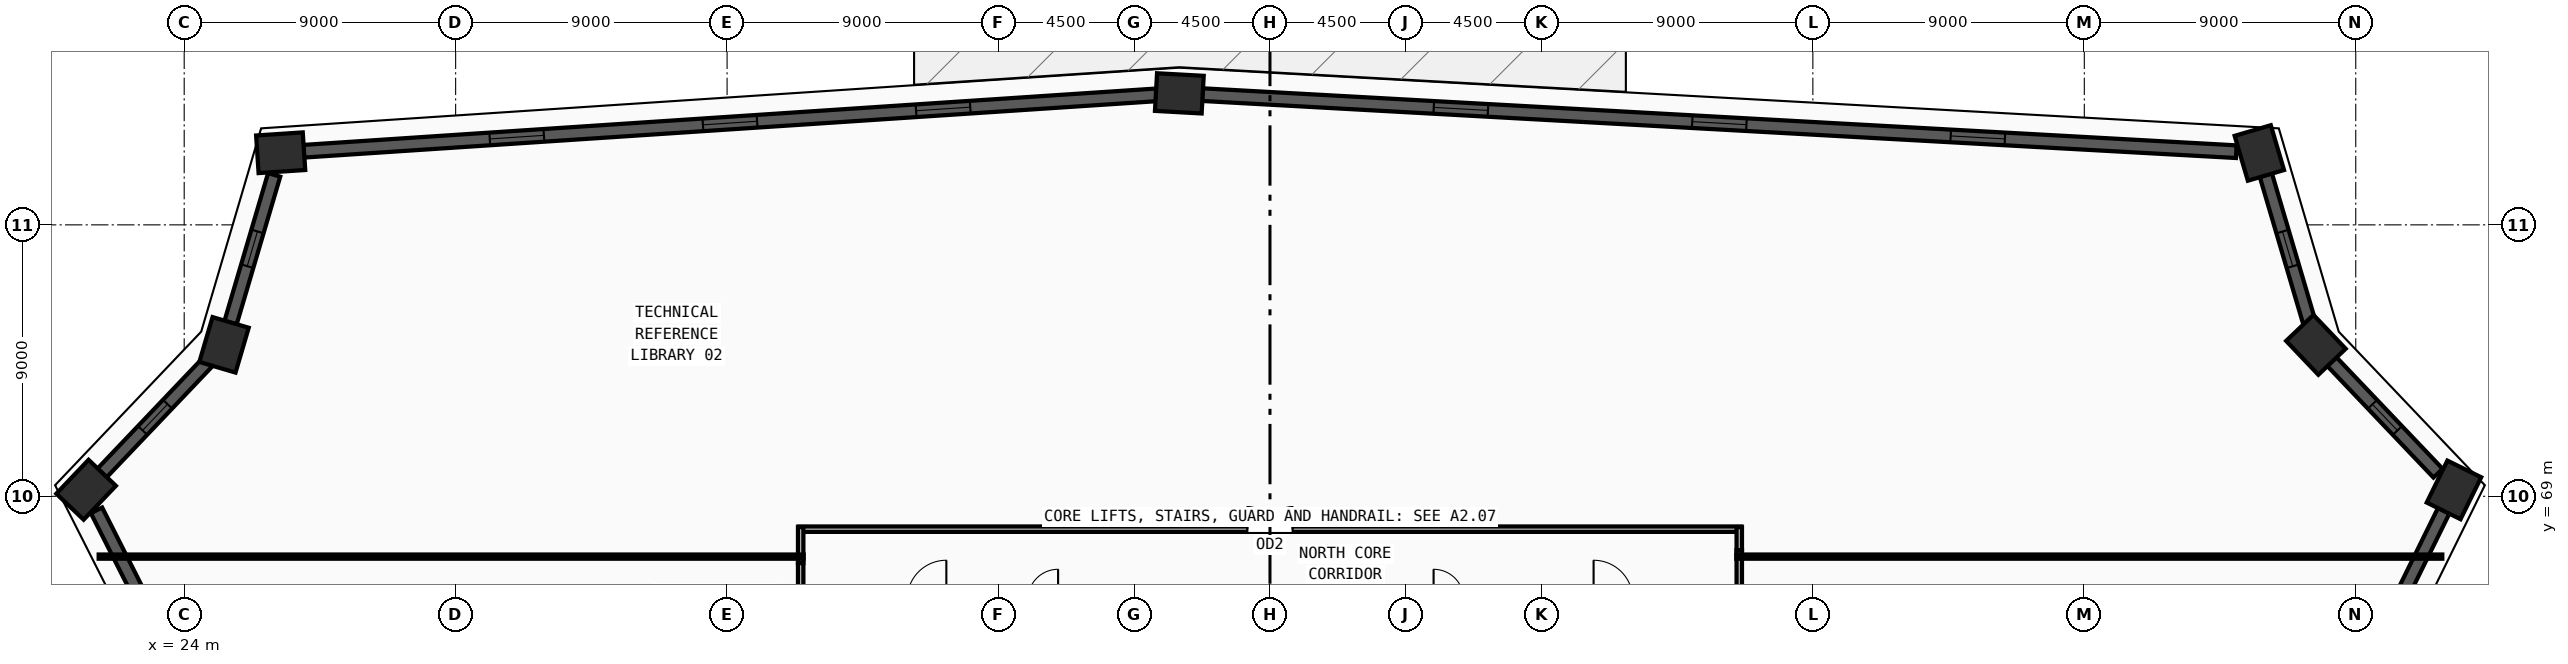
"""IFC4 building model, lengths in metres.
Left out: names, types, materials, properties, quantities, classifications, styles, units other than length and angle.
Written with IfcOpenShell. Run it as: python <this file> out.ifc"""

import sys

from ifc_helpers import new_model, si_unit, direction, frame, frame_2d, origin, origin_2d, place, context, subcontext, project, spatial, rectangle, extrude, source, transform, mapped, element, fill, save


model = new_model("IFC4")
c1 = context("Model", 3, precision=1e-05, world=origin(), true_north=direction((0.0, 1.0)))
c2 = subcontext(c1, "Body", "Model", "MODEL_VIEW")
j1 = project(units=[si_unit("LENGTHUNIT", "METRE"), si_unit("PLANEANGLEUNIT", "RADIAN")], contexts=[c1])
p1 = place(None, origin())
s1 = spatial("IfcSite", under=j1, at=p1, CompositionType="ELEMENT")
p2 = place(p1, origin())
s2 = spatial("IfcBuilding", under=s1, at=p2, CompositionType="ELEMENT")
p3 = place(p2, frame((0.0, 0.0, 28.5)))
s3 = spatial("IfcBuildingStorey", under=s2, at=p3, CompositionType="ELEMENT", Elevation=28.5)
m1 = source(origin(), c2, "Body", "SweptSolid", [
    extrude(rectangle(XDim=1.55, YDim=1.25, at=origin_2d()), origin(), (0.0, 0.0, 1.0), 3.75),
])
for number, where, z_axis, x_axis in (
    (1, (20.748, 69.217, 0.0), (0.0, 0.0, 1.0), (0.689, 0.724, 0.0)),
    (2, (25.321, 74.022, 0.0), (0.0, 0.0, 1.0), (0.283, 0.959, 0.0)),
    (3, (27.199, 80.391, 0.0), (0.0, 0.0, 1.0), (0.998, 0.066, 0.0)),
    (4, (56.995, 82.36, 0.0), (0.0, 0.0, 1.0), (-0.998, 0.055, 0.0)),
    (5, (92.803, 80.384, 0.0), (0.0, 0.0, 1.0), (-0.283, 0.959, 0.0)),
    (6, (94.679, 74.022, 0.0), (0.0, 0.0, 1.0), (-0.689, 0.724, 0.0)),
    (7, (99.256, 69.212, 0.0), (0.0, 0.0, 1.0), (0.442, 0.897, 0.0)),
):
    element("IfcColumn", number, at=place(p3, frame(where, z_axis=z_axis, x_axis=x_axis)), inside=s3, PredefinedType="COLUMN", context=c2, shape_type="MappedRepresentation", body=[
        mapped(m1, transform((0.0, 0.0, 0.0), x_axis=(1.0, 0.0, 0.0), y_axis=(0.0, 1.0, 0.0), z_axis=(0.0, 0.0, 1.0), scale=1.0)),
    ])
p4 = place(p3, frame((86.402, 43.109, 0.0), z_axis=(0.0, 0.0, 1.0), x_axis=(0.441766083851, 0.897130273238, 0.0)))
e8 = element("IfcWall", 8, at=p4, inside=s3, PredefinedType="SOLIDWALL", context=c2, shape_type="SweptSolid", body=[
    extrude(rectangle(XDim=28.332, YDim=0.42, at=frame_2d((14.166, 0.0))), origin(), (0.0, 0.0, 1.0), 3.57),
])
m2 = source(origin(), c2, "Body", "SweptSolid", [
    extrude(rectangle(XDim=1.8, YDim=1.95, at=frame_2d((0.9, 0.975))), frame((0.0, 0.22, 0.0), z_axis=(0.0, -1.0, 0.0), x_axis=(1.0, 0.0, 0.0)), (0.0, 0.0, 1.0), 0.44),
])
p5 = place(p4, frame((6.183, 0.0, 0.55)))
e9 = element("IfcOpeningElement", 9, at=p5, cuts=e8, PredefinedType="OPENING", context=c2, shape_type="MappedRepresentation", body=[
    mapped(m2, transform((0.0, 0.0, 0.0), x_axis=(1.0, 0.0, 0.0), y_axis=(0.0, 1.0, 0.0), z_axis=(0.0, 0.0, 1.0), scale=1.0)),
])
p6 = place(p4, frame((13.266, 0.0, 0.55)))
e10 = element("IfcOpeningElement", 10, at=p6, cuts=e8, PredefinedType="OPENING", context=c2, shape_type="MappedRepresentation", body=[
    mapped(m2, transform((0.0, 0.0, 0.0), x_axis=(1.0, 0.0, 0.0), y_axis=(0.0, 1.0, 0.0), z_axis=(0.0, 0.0, 1.0), scale=1.0)),
])
p7 = place(p4, frame((20.349, 0.0, 0.55)))
e11 = element("IfcOpeningElement", 11, at=p7, cuts=e8, PredefinedType="OPENING", context=c2, shape_type="MappedRepresentation", body=[
    mapped(m2, transform((0.0, 0.0, 0.0), x_axis=(1.0, 0.0, 0.0), y_axis=(0.0, 1.0, 0.0), z_axis=(0.0, 0.0, 1.0), scale=1.0)),
])
p8 = place(p3, frame((98.729, 69.766, 0.0), z_axis=(0.0, 0.0, 1.0), x_axis=(-0.689380748277, 0.724399188228, 0.0)))
e12 = element("IfcWall", 12, at=p8, inside=s3, PredefinedType="SOLIDWALL", context=c2, shape_type="SweptSolid", body=[
    extrude(rectangle(XDim=5.11, YDim=0.42, at=frame_2d((2.555, 0.0))), origin(), (0.0, 0.0, 1.0), 3.57),
])
m3 = source(origin(), c2, "Body", "SweptSolid", [
    extrude(rectangle(XDim=1.2, YDim=1.9, at=frame_2d((0.6, 0.95))), frame((0.0, 0.22, 0.0), z_axis=(0.0, -1.0, 0.0), x_axis=(1.0, 0.0, 0.0)), (0.0, 0.0, 1.0), 0.44),
])
p9 = place(p8, frame((1.955, 0.0, 0.55)))
e13 = element("IfcOpeningElement", 13, at=p9, cuts=e12, PredefinedType="OPENING", context=c2, shape_type="MappedRepresentation", body=[
    mapped(m3, transform((0.0, 0.0, 0.0), x_axis=(1.0, 0.0, 0.0), y_axis=(0.0, 1.0, 0.0), z_axis=(0.0, 0.0, 1.0), scale=1.0)),
])
p10 = place(p3, frame((94.463, 74.756, 0.0), z_axis=(0.0, 0.0, 1.0), x_axis=(-0.282977060142, 0.959126677469, 0.0)))
e14 = element("IfcWall", 14, at=p10, inside=s3, PredefinedType="SOLIDWALL", context=c2, shape_type="SweptSolid", body=[
    extrude(rectangle(XDim=5.102, YDim=0.42, at=frame_2d((2.551, 0.0))), origin(), (0.0, 0.0, 1.0), 3.57),
])
p11 = place(p10, frame((1.951, 0.0, 0.55)))
e15 = element("IfcOpeningElement", 15, at=p11, cuts=e14, PredefinedType="OPENING", context=c2, shape_type="MappedRepresentation", body=[
    mapped(m3, transform((0.0, 0.0, 0.0), x_axis=(1.0, 0.0, 0.0), y_axis=(0.0, 1.0, 0.0), z_axis=(0.0, 0.0, 1.0), scale=1.0)),
])
p12 = place(p3, frame((92.039, 80.426, 0.0), z_axis=(0.0, 0.0, 1.0), x_axis=(-0.998480221771, 0.055111221476, 0.0)))
e16 = element("IfcWall", 16, at=p12, inside=s3, PredefinedType="SOLIDWALL", context=c2, shape_type="SweptSolid", body=[
    extrude(rectangle(XDim=34.332, YDim=0.42, at=frame_2d((17.166, 0.0))), origin(), (0.0, 0.0, 1.0), 3.57),
])
p13 = place(p12, frame((7.683, 0.0, 0.55)))
e17 = element("IfcOpeningElement", 17, at=p13, cuts=e16, PredefinedType="OPENING", context=c2, shape_type="MappedRepresentation", body=[
    mapped(m2, transform((0.0, 0.0, 0.0), x_axis=(1.0, 0.0, 0.0), y_axis=(0.0, 1.0, 0.0), z_axis=(0.0, 0.0, 1.0), scale=1.0)),
])
p14 = place(p12, frame((16.266, 0.0, 0.55)))
e18 = element("IfcOpeningElement", 18, at=p14, cuts=e16, PredefinedType="OPENING", context=c2, shape_type="MappedRepresentation", body=[
    mapped(m2, transform((0.0, 0.0, 0.0), x_axis=(1.0, 0.0, 0.0), y_axis=(0.0, 1.0, 0.0), z_axis=(0.0, 0.0, 1.0), scale=1.0)),
])
p15 = place(p12, frame((24.849, 0.0, 0.55)))
e19 = element("IfcOpeningElement", 19, at=p15, cuts=e16, PredefinedType="OPENING", context=c2, shape_type="MappedRepresentation", body=[
    mapped(m2, transform((0.0, 0.0, 0.0), x_axis=(1.0, 0.0, 0.0), y_axis=(0.0, 1.0, 0.0), z_axis=(0.0, 0.0, 1.0), scale=1.0)),
])
p16 = place(p3, frame((56.232, 82.31, 0.0), z_axis=(0.0, 0.0, 1.0), x_axis=(-0.997821383979, -0.06597337095, 0.0)))
e20 = element("IfcWall", 20, at=p16, inside=s3, PredefinedType="SOLIDWALL", context=c2, shape_type="SweptSolid", body=[
    extrude(rectangle(XDim=28.332, YDim=0.42, at=frame_2d((14.166, 0.0))), origin(), (0.0, 0.0, 1.0), 3.57),
])
p17 = place(p16, frame((6.183, 0.0, 0.55)))
e21 = element("IfcOpeningElement", 21, at=p17, cuts=e20, PredefinedType="OPENING", context=c2, shape_type="MappedRepresentation", body=[
    mapped(m2, transform((0.0, 0.0, 0.0), x_axis=(1.0, 0.0, 0.0), y_axis=(0.0, 1.0, 0.0), z_axis=(0.0, 0.0, 1.0), scale=1.0)),
])
p18 = place(p16, frame((13.266, 0.0, 0.55)))
e22 = element("IfcOpeningElement", 22, at=p18, cuts=e20, PredefinedType="OPENING", context=c2, shape_type="MappedRepresentation", body=[
    mapped(m2, transform((0.0, 0.0, 0.0), x_axis=(1.0, 0.0, 0.0), y_axis=(0.0, 1.0, 0.0), z_axis=(0.0, 0.0, 1.0), scale=1.0)),
])
p19 = place(p16, frame((20.349, 0.0, 0.55)))
e23 = element("IfcOpeningElement", 23, at=p19, cuts=e20, PredefinedType="OPENING", context=c2, shape_type="MappedRepresentation", body=[
    mapped(m2, transform((0.0, 0.0, 0.0), x_axis=(1.0, 0.0, 0.0), y_axis=(0.0, 1.0, 0.0), z_axis=(0.0, 0.0, 1.0), scale=1.0)),
])
p20 = place(p3, frame((26.983, 79.657, 0.0), z_axis=(0.0, 0.0, 1.0), x_axis=(-0.282952619542, -0.959133887992, 0.0)))
e24 = element("IfcWall", 24, at=p20, inside=s3, PredefinedType="SOLIDWALL", context=c2, shape_type="SweptSolid", body=[
    extrude(rectangle(XDim=5.11, YDim=0.42, at=frame_2d((2.555, 0.0))), origin(), (0.0, 0.0, 1.0), 3.57),
])
p21 = place(p20, frame((1.955, 0.0, 0.55)))
e25 = element("IfcOpeningElement", 25, at=p21, cuts=e24, PredefinedType="OPENING", context=c2, shape_type="MappedRepresentation", body=[
    mapped(m3, transform((0.0, 0.0, 0.0), x_axis=(1.0, 0.0, 0.0), y_axis=(0.0, 1.0, 0.0), z_axis=(0.0, 0.0, 1.0), scale=1.0)),
])
p22 = place(p3, frame((24.794, 73.468, 0.0), z_axis=(0.0, 0.0, 1.0), x_axis=(-0.689456877946, -0.724326731146, 0.0)))
e26 = element("IfcWall", 26, at=p22, inside=s3, PredefinedType="SOLIDWALL", context=c2, shape_type="SweptSolid", body=[
    extrude(rectangle(XDim=5.104, YDim=0.42, at=frame_2d((2.552, 0.0))), origin(), (0.0, 0.0, 1.0), 3.57),
])
p23 = place(p22, frame((1.952, 0.0, 0.55)))
e27 = element("IfcOpeningElement", 27, at=p23, cuts=e26, PredefinedType="OPENING", context=c2, shape_type="MappedRepresentation", body=[
    mapped(m3, transform((0.0, 0.0, 0.0), x_axis=(1.0, 0.0, 0.0), y_axis=(0.0, 1.0, 0.0), z_axis=(0.0, 0.0, 1.0), scale=1.0)),
])
p24 = place(p3, frame((21.093, 68.534, 0.0), z_axis=(0.0, 0.0, 1.0), x_axis=(0.451540292752, -0.892250729348, 0.0)))
e28 = element("IfcWall", 28, at=p24, inside=s3, PredefinedType="SOLIDWALL", context=c2, shape_type="SweptSolid", body=[
    extrude(rectangle(XDim=34.333, YDim=0.42, at=frame_2d((17.167, 0.0))), origin(), (0.0, 0.0, 1.0), 3.57),
])
p25 = place(p24, frame((7.683, 0.0, 0.55)))
e29 = element("IfcOpeningElement", 29, at=p25, cuts=e28, PredefinedType="OPENING", context=c2, shape_type="MappedRepresentation", body=[
    mapped(m2, transform((0.0, 0.0, 0.0), x_axis=(1.0, 0.0, 0.0), y_axis=(0.0, 1.0, 0.0), z_axis=(0.0, 0.0, 1.0), scale=1.0)),
])
p26 = place(p24, frame((16.267, 0.0, 0.55)))
e30 = element("IfcOpeningElement", 30, at=p26, cuts=e28, PredefinedType="OPENING", context=c2, shape_type="MappedRepresentation", body=[
    mapped(m2, transform((0.0, 0.0, 0.0), x_axis=(1.0, 0.0, 0.0), y_axis=(0.0, 1.0, 0.0), z_axis=(0.0, 0.0, 1.0), scale=1.0)),
])
p27 = place(p24, frame((24.0, 0.0, 0.55)))
e31 = element("IfcOpeningElement", 31, at=p27, cuts=e28, PredefinedType="OPENING", context=c2, shape_type="MappedRepresentation", body=[
    mapped(m2, transform((0.0, 0.0, 0.0), x_axis=(1.0, 0.0, 0.0), y_axis=(0.0, 1.0, 0.0), z_axis=(0.0, 0.0, 1.0), scale=1.0)),
])
p28 = place(p3, frame((75.56, 67.215, 0.0), z_axis=(0.0, 0.0, 1.0), x_axis=(0.0, -1.0, 0.0)))
e32 = element("IfcWall", 32, at=p28, inside=s3, PredefinedType="PARTITIONING", context=c2, shape_type="SweptSolid", body=[
    extrude(rectangle(XDim=15.43, YDim=0.18, at=frame_2d((7.715, 0.0))), origin(), (0.0, 0.0, 1.0), 3.57),
])
m4 = source(origin(), c2, "Body", "SweptSolid", [
    extrude(rectangle(XDim=1.5, YDim=2.2, at=frame_2d((0.75, 1.1))), frame((0.0, 0.1, 0.0), z_axis=(0.0, -1.0, 0.0), x_axis=(1.0, 0.0, 0.0)), (0.0, 0.0, 1.0), 0.2),
])
p29 = place(p28, frame((6.965, 0.0, 0.0)))
e33 = element("IfcOpeningElement", 33, at=p29, cuts=e32, PredefinedType="OPENING", context=c2, shape_type="MappedRepresentation", body=[
    mapped(m4, transform((0.0, 0.0, 0.0), x_axis=(1.0, 0.0, 0.0), y_axis=(0.0, 1.0, 0.0), z_axis=(0.0, 0.0, 1.0), scale=1.0)),
])
p30 = place(p3, frame((44.37, 67.91, 0.0), z_axis=(0.0, 0.0, 1.0), x_axis=(1.0, 0.0, 0.0)))
e34 = element("IfcWall", 34, at=p30, inside=s3, PredefinedType="PARTITIONING", context=c2, shape_type="SweptSolid", body=[
    extrude(rectangle(XDim=31.26, YDim=0.18, at=frame_2d((15.63, 0.0))), origin(), (0.0, 0.0, 1.0), 3.57),
])
p31 = place(p30, frame((14.88, 0.0, 0.0)))
e35 = element("IfcOpeningElement", 35, at=p31, cuts=e34, PredefinedType="OPENING", context=c2, shape_type="MappedRepresentation", body=[
    mapped(m4, transform((0.0, 0.0, 0.0), x_axis=(1.0, 0.0, 0.0), y_axis=(0.0, 1.0, 0.0), z_axis=(0.0, 0.0, 1.0), scale=1.0)),
])
p32 = place(p3, frame((44.44, 66.785, 0.0), z_axis=(0.0, 0.0, 1.0), x_axis=(0.0, 1.0, 0.0)))
e36 = element("IfcWall", 36, at=p32, inside=s3, PredefinedType="PARTITIONING", context=c2, shape_type="SweptSolid", body=[
    extrude(rectangle(XDim=1.195, YDim=0.18, at=frame_2d((0.598, 0.0))), origin(), (0.0, 0.0, 1.0), 3.57),
])
p33 = place(p3, frame((75.56, 67.98, 0.0), z_axis=(0.0, 0.0, 1.0), x_axis=(0.0, -1.0, 0.0)))
e37 = element("IfcWall", 37, at=p33, inside=s3, PredefinedType="PARTITIONING", context=c2, shape_type="SweptSolid", body=[
    extrude(rectangle(XDim=0.765, YDim=0.18, at=frame_2d((0.382, 0.0))), origin(), (0.0, 0.0, 1.0), 3.57),
])
p34 = place(p3, frame((44.44, 64.98, 0.0), z_axis=(0.0, 0.0, 1.0), x_axis=(0.0, 1.0, 0.0)))
e38 = element("IfcWall", 38, at=p34, inside=s3, PredefinedType="PARTITIONING", context=c2, shape_type="SweptSolid", body=[
    extrude(rectangle(XDim=1.805, YDim=0.18, at=frame_2d((0.902, 0.0))), origin(), (0.0, 0.0, 1.0), 3.57),
])
p35 = place(p3, frame((44.54, 67.0, 0.0), z_axis=(0.0, 0.0, 1.0), x_axis=(-1.0, 0.0, 0.0)))
e39 = element("IfcWall", 39, at=p35, inside=s3, PredefinedType="PARTITIONING", context=c2, shape_type="SweptSolid", body=[
    extrude(rectangle(XDim=23.376, YDim=0.14, at=frame_2d((11.688, 0.0))), origin(), (0.0, 0.0, 1.0), 2.655),
])
p36 = place(p3, frame((75.46, 67.0, 0.0), z_axis=(0.0, 0.0, 1.0), x_axis=(1.0, 0.0, 0.0)))
e40 = element("IfcWall", 40, at=p36, inside=s3, PredefinedType="PARTITIONING", context=c2, shape_type="SweptSolid", body=[
    extrude(rectangle(XDim=23.41, YDim=0.14, at=frame_2d((11.705, 0.0))), origin(), (0.0, 0.0, 1.0), 2.655),
])
m5 = source(origin(), c2, "Body", "SweptSolid", [
    extrude(rectangle(XDim=1.2, YDim=1.9, at=frame_2d((0.6, 0.95))), frame((0.0, 0.03, 0.0), z_axis=(0.0, -1.0, 0.0), x_axis=(1.0, 0.0, 0.0)), (0.0, 0.0, 1.0), 0.06),
])
p37 = place(p9, origin())
e41 = element("IfcWindow", 41, at=p37, inside=s3, PartitioningType="SINGLE_PANEL", PredefinedType="WINDOW", context=c2, shape_type="MappedRepresentation", body=[
    mapped(m5, transform((0.0, 0.0, 0.0), x_axis=(1.0, 0.0, 0.0), y_axis=(0.0, 1.0, 0.0), z_axis=(0.0, 0.0, 1.0), scale=1.0)),
])
fill(e13, e41)
p38 = place(p11, origin())
e42 = element("IfcWindow", 42, at=p38, inside=s3, PartitioningType="SINGLE_PANEL", PredefinedType="WINDOW", context=c2, shape_type="MappedRepresentation", body=[
    mapped(m5, transform((0.0, 0.0, 0.0), x_axis=(1.0, 0.0, 0.0), y_axis=(0.0, 1.0, 0.0), z_axis=(0.0, 0.0, 1.0), scale=1.0)),
])
fill(e15, e42)
m6 = source(origin(), c2, "Body", "SweptSolid", [
    extrude(rectangle(XDim=1.8, YDim=1.95, at=frame_2d((0.9, 0.975))), frame((0.0, 0.03, 0.0), z_axis=(0.0, -1.0, 0.0), x_axis=(1.0, 0.0, 0.0)), (0.0, 0.0, 1.0), 0.06),
])
p39 = place(p13, origin())
e43 = element("IfcWindow", 43, at=p39, inside=s3, PartitioningType="DOUBLE_PANEL_VERTICAL", PredefinedType="WINDOW", context=c2, shape_type="MappedRepresentation", body=[
    mapped(m6, transform((0.0, 0.0, 0.0), x_axis=(1.0, 0.0, 0.0), y_axis=(0.0, 1.0, 0.0), z_axis=(0.0, 0.0, 1.0), scale=1.0)),
])
fill(e17, e43)
p40 = place(p14, origin())
e44 = element("IfcWindow", 44, at=p40, inside=s3, PartitioningType="DOUBLE_PANEL_VERTICAL", PredefinedType="WINDOW", context=c2, shape_type="MappedRepresentation", body=[
    mapped(m6, transform((0.0, 0.0, 0.0), x_axis=(1.0, 0.0, 0.0), y_axis=(0.0, 1.0, 0.0), z_axis=(0.0, 0.0, 1.0), scale=1.0)),
])
fill(e18, e44)
p41 = place(p15, origin())
e45 = element("IfcWindow", 45, at=p41, inside=s3, PartitioningType="DOUBLE_PANEL_VERTICAL", PredefinedType="WINDOW", context=c2, shape_type="MappedRepresentation", body=[
    mapped(m6, transform((0.0, 0.0, 0.0), x_axis=(1.0, 0.0, 0.0), y_axis=(0.0, 1.0, 0.0), z_axis=(0.0, 0.0, 1.0), scale=1.0)),
])
fill(e19, e45)
p42 = place(p17, origin())
e46 = element("IfcWindow", 46, at=p42, inside=s3, PartitioningType="DOUBLE_PANEL_VERTICAL", PredefinedType="WINDOW", context=c2, shape_type="MappedRepresentation", body=[
    mapped(m6, transform((0.0, 0.0, 0.0), x_axis=(1.0, 0.0, 0.0), y_axis=(0.0, 1.0, 0.0), z_axis=(0.0, 0.0, 1.0), scale=1.0)),
])
fill(e21, e46)
p43 = place(p18, origin())
e47 = element("IfcWindow", 47, at=p43, inside=s3, PartitioningType="DOUBLE_PANEL_VERTICAL", PredefinedType="WINDOW", context=c2, shape_type="MappedRepresentation", body=[
    mapped(m6, transform((0.0, 0.0, 0.0), x_axis=(1.0, 0.0, 0.0), y_axis=(0.0, 1.0, 0.0), z_axis=(0.0, 0.0, 1.0), scale=1.0)),
])
fill(e22, e47)
p44 = place(p19, origin())
e48 = element("IfcWindow", 48, at=p44, inside=s3, PartitioningType="DOUBLE_PANEL_VERTICAL", PredefinedType="WINDOW", context=c2, shape_type="MappedRepresentation", body=[
    mapped(m6, transform((0.0, 0.0, 0.0), x_axis=(1.0, 0.0, 0.0), y_axis=(0.0, 1.0, 0.0), z_axis=(0.0, 0.0, 1.0), scale=1.0)),
])
fill(e23, e48)
p45 = place(p21, origin())
e49 = element("IfcWindow", 49, at=p45, inside=s3, PartitioningType="SINGLE_PANEL", PredefinedType="WINDOW", context=c2, shape_type="MappedRepresentation", body=[
    mapped(m5, transform((0.0, 0.0, 0.0), x_axis=(1.0, 0.0, 0.0), y_axis=(0.0, 1.0, 0.0), z_axis=(0.0, 0.0, 1.0), scale=1.0)),
])
fill(e25, e49)
p46 = place(p23, origin())
e50 = element("IfcWindow", 50, at=p46, inside=s3, PartitioningType="SINGLE_PANEL", PredefinedType="WINDOW", context=c2, shape_type="MappedRepresentation", body=[
    mapped(m5, transform((0.0, 0.0, 0.0), x_axis=(1.0, 0.0, 0.0), y_axis=(0.0, 1.0, 0.0), z_axis=(0.0, 0.0, 1.0), scale=1.0)),
])
fill(e27, e50)
m7 = source(origin(), c2, "Body", "SweptSolid", [
    extrude(rectangle(XDim=1.5, YDim=2.2, at=frame_2d((0.75, 1.1))), frame((0.0, 0.025, 0.0), z_axis=(0.0, -1.0, 0.0), x_axis=(1.0, 0.0, 0.0)), (0.0, 0.0, 1.0), 0.05),
])
p47 = place(p31, origin())
e51 = element("IfcDoor", 51, at=p47, inside=s3, OperationType="DOUBLE_DOOR_SINGLE_SWING", PredefinedType="DOOR", context=c2, shape_type="MappedRepresentation", body=[
    mapped(m7, transform((0.0, 0.0, 0.0), x_axis=(1.0, 0.0, 0.0), y_axis=(0.0, 1.0, 0.0), z_axis=(0.0, 0.0, 1.0), scale=1.0)),
])
fill(e35, e51)
save(model, sys.argv[1])
